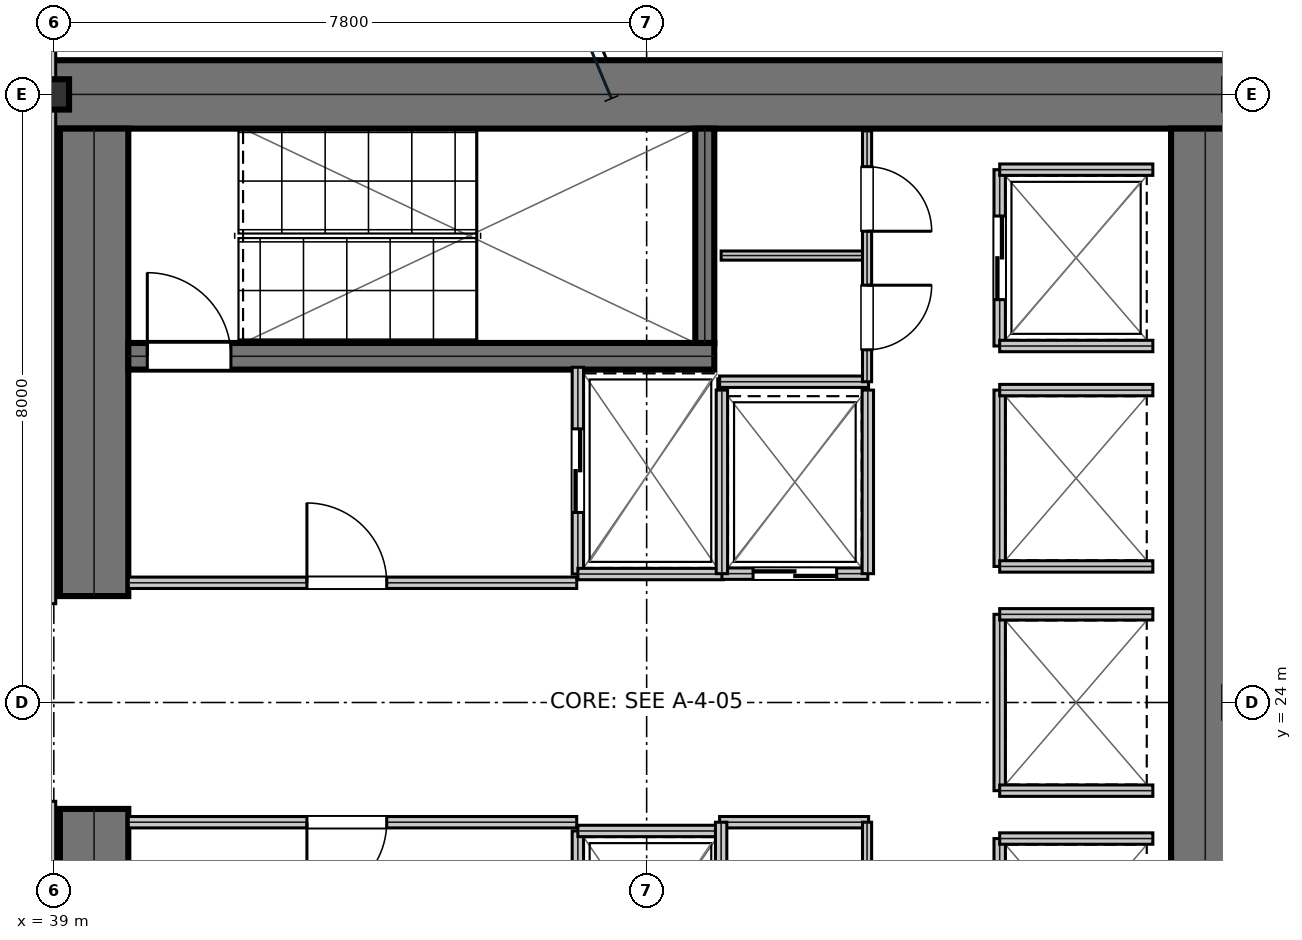
"""IFC4 building model, lengths in metres.
Left out: names, types, materials, properties, quantities, classifications, styles, units other than length and angle.
Written with IfcOpenShell. Run it as: python <this file> out.ifc"""

import sys

from ifc_helpers import new_model, si_unit, direction, frame, frame_2d, origin, origin_2d, place, context, subcontext, project, spatial, rectangle, i_section, extrude, element, fill, save


model = new_model("IFC4")
c1 = context("Model", 3, precision=1e-05, world=origin(), true_north=direction((0.0, 1.0)))
c2 = subcontext(c1, "Body", "Model", "MODEL_VIEW")
j1 = project(units=[si_unit("LENGTHUNIT", "METRE"), si_unit("PLANEANGLEUNIT", "RADIAN")], contexts=[c1])
p1 = place(None, origin())
s1 = spatial("IfcSite", under=j1, at=p1, CompositionType="ELEMENT")
p2 = place(p1, origin())
s2 = spatial("IfcBuilding", under=s1, at=p2, CompositionType="ELEMENT")
p3 = place(p2, frame((0.0, 0.0, 82.35)))
s3 = spatial("IfcBuildingStorey", under=s2, at=p3, CompositionType="ELEMENT", Elevation=82.35)
p4 = place(p3, frame((38.8, 32.0, 0.0), z_axis=(0.0, 0.0, 1.0), x_axis=(1.0, 0.0, 0.0)))
e1 = element("IfcWall", 1, at=p4, inside=s3, PredefinedType="SHEAR", context=c2, shape_type="SweptSolid", body=[
    extrude(rectangle(XDim=16.0, YDim=0.9, at=frame_2d((8.0, 0.0))), origin(), (0.0, 0.0, 1.0), 3.81),
])
for number, where, z_axis, x_axis in (
    (2, (39.53, 16.45, 0.0), (0.0, 0.0, 1.0), (0.0, 1.0, 0.0)),
    (3, (39.53, 25.4, 0.0), (0.0, 0.0, 1.0), (0.0, 1.0, 0.0)),
):
    element("IfcWall", number, at=place(p3, frame(where, z_axis=z_axis, x_axis=x_axis)), inside=s3, PredefinedType="SHEAR", context=c2, shape_type="SweptSolid", body=[
        extrude(rectangle(XDim=6.15, YDim=0.9, at=frame_2d((3.075, 0.0))), origin(), (0.0, 0.0, 1.0), 3.81),
    ])
p5 = place(p3, frame((54.15, 16.45, 0.0), z_axis=(0.0, 0.0, 1.0), x_axis=(0.0, 1.0, 0.0)))
e4 = element("IfcWall", 4, at=p5, inside=s3, PredefinedType="SHEAR", context=c2, shape_type="SweptSolid", body=[
    extrude(rectangle(XDim=15.1, YDim=0.9, at=frame_2d((7.55, 0.0))), origin(), (0.0, 0.0, 1.0), 3.81),
])
p6 = place(p3, frame((39.98, 28.555, 0.0), z_axis=(0.0, 0.0, 1.0), x_axis=(1.0, 0.0, 0.0)))
e5 = element("IfcWall", 5, at=p6, inside=s3, PredefinedType="SHEAR", context=c2, shape_type="SweptSolid", body=[
    extrude(rectangle(XDim=7.71, YDim=0.35, at=frame_2d((3.855, 0.0))), origin(), (0.0, 0.0, 1.0), 3.81),
])
p7 = place(p6, frame((0.25, 0.0, 0.0)))
e6 = element("IfcOpeningElement", 6, at=p7, cuts=e5, PredefinedType="OPENING", context=c2, shape_type="SweptSolid", body=[
    extrude(rectangle(XDim=1.1, YDim=2.15, at=frame_2d((0.55, 1.075))), frame((0.0, 0.185, 0.0), z_axis=(0.0, -1.0, 0.0), x_axis=(1.0, 0.0, 0.0)), (0.0, 0.0, 1.0), 0.37),
])
p8 = place(p3, frame((47.565, 28.73, 0.0), z_axis=(0.0, 0.0, 1.0), x_axis=(0.0, 1.0, 0.0)))
e7 = element("IfcWall", 7, at=p8, inside=s3, PredefinedType="SHEAR", context=c2, shape_type="SweptSolid", body=[
    extrude(rectangle(XDim=2.82, YDim=0.25, at=frame_2d((1.41, 0.0))), origin(), (0.0, 0.0, 1.0), 3.81),
])
p9 = place(p3, frame((39.0, 32.0, 0.0), z_axis=(0.0, 0.0, 1.0), x_axis=(1.0, 0.0, 0.0)))
e8 = element("IfcColumn", 8, at=p9, inside=s3, PredefinedType="COLUMN", context=c2, shape_type="SweptSolid", body=[
    extrude(i_section(OverallWidth=0.401, OverallDepth=0.399, WebThickness=0.025, FlangeThickness=0.04, at=origin_2d()), origin(), (0.0, 0.0, 1.0), 4.044),
])
p10 = place(p3, frame((39.98, 25.575, 0.0), z_axis=(0.0, 0.0, 1.0), x_axis=(1.0, 0.0, 0.0)))
e9 = element("IfcWall", 9, at=p10, inside=s3, PredefinedType="PARTITIONING", context=c2, shape_type="SweptSolid", body=[
    extrude(rectangle(XDim=5.9, YDim=0.15, at=frame_2d((2.95, 0.0))), origin(), (0.0, 0.0, 1.0), 3.81),
])
p11 = place(p10, frame((2.35, 0.0, 0.0)))
e10 = element("IfcOpeningElement", 10, at=p11, cuts=e9, PredefinedType="OPENING", context=c2, shape_type="SweptSolid", body=[
    extrude(rectangle(XDim=1.05, YDim=2.15, at=frame_2d((0.525, 1.075))), frame((0.0, 0.085, 0.0), z_axis=(0.0, -1.0, 0.0), x_axis=(1.0, 0.0, 0.0)), (0.0, 0.0, 1.0), 0.17),
])
p12 = place(p3, frame((39.98, 22.425, 0.0), z_axis=(0.0, 0.0, 1.0), x_axis=(1.0, 0.0, 0.0)))
e11 = element("IfcWall", 11, at=p12, inside=s3, PredefinedType="PARTITIONING", context=c2, shape_type="SweptSolid", body=[
    extrude(rectangle(XDim=5.9, YDim=0.15, at=frame_2d((2.95, 0.0))), origin(), (0.0, 0.0, 1.0), 3.81),
])
p13 = place(p12, frame((2.35, 0.0, 0.0)))
e12 = element("IfcOpeningElement", 12, at=p13, cuts=e11, PredefinedType="OPENING", context=c2, shape_type="SweptSolid", body=[
    extrude(rectangle(XDim=1.05, YDim=2.15, at=frame_2d((0.525, 1.075))), frame((0.0, 0.085, 0.0), z_axis=(0.0, -1.0, 0.0), x_axis=(1.0, 0.0, 0.0)), (0.0, 0.0, 1.0), 0.17),
])
p14 = place(p3, frame((45.895, 25.69, 0.0), z_axis=(0.0, 0.0, 1.0), x_axis=(0.0, 1.0, 0.0)))
e13 = element("IfcWall", 13, at=p14, inside=s3, PredefinedType="PARTITIONING", context=c2, shape_type="SweptSolid", body=[
    extrude(rectangle(XDim=2.72, YDim=0.15, at=frame_2d((1.36, 0.0))), origin(), (0.0, 0.0, 1.0), 3.81),
])
p15 = place(p14, frame((0.81, 0.0, 0.0)))
e14 = element("IfcOpeningElement", 14, at=p15, cuts=e13, PredefinedType="OPENING", context=c2, shape_type="SweptSolid", body=[
    extrude(rectangle(XDim=1.1, YDim=2.15, at=frame_2d((0.55, 1.075))), frame((0.0, 0.085, 0.0), z_axis=(0.0, -1.0, 0.0), x_axis=(1.0, 0.0, 0.0)), (0.0, 0.0, 1.0), 0.17),
])
p16 = place(p3, frame((45.895, 25.69, 0.0), z_axis=(0.0, 0.0, 1.0), x_axis=(1.0, 0.0, 0.0)))
e15 = element("IfcWall", 15, at=p16, inside=s3, PredefinedType="PARTITIONING", context=c2, shape_type="SweptSolid", body=[
    extrude(rectangle(XDim=1.915, YDim=0.15, at=frame_2d((0.958, 0.0))), origin(), (0.0, 0.0, 1.0), 3.81),
])
p17 = place(p3, frame((45.895, 19.59, 0.0), z_axis=(0.0, 0.0, 1.0), x_axis=(0.0, 1.0, 0.0)))
e16 = element("IfcWall", 16, at=p17, inside=s3, PredefinedType="PARTITIONING", context=c2, shape_type="SweptSolid", body=[
    extrude(rectangle(XDim=2.72, YDim=0.15, at=frame_2d((1.36, 0.0))), origin(), (0.0, 0.0, 1.0), 3.81),
])
p18 = place(p17, frame((0.81, 0.0, 0.0)))
e17 = element("IfcOpeningElement", 17, at=p18, cuts=e16, PredefinedType="OPENING", context=c2, shape_type="SweptSolid", body=[
    extrude(rectangle(XDim=1.1, YDim=2.15, at=frame_2d((0.55, 1.075))), frame((0.0, 0.085, 0.0), z_axis=(0.0, -1.0, 0.0), x_axis=(1.0, 0.0, 0.0)), (0.0, 0.0, 1.0), 0.17),
])
p19 = place(p3, frame((45.895, 22.31, 0.0), z_axis=(0.0, 0.0, 1.0), x_axis=(1.0, 0.0, 0.0)))
e18 = element("IfcWall", 18, at=p19, inside=s3, PredefinedType="PARTITIONING", context=c2, shape_type="SweptSolid", body=[
    extrude(rectangle(XDim=1.915, YDim=0.15, at=frame_2d((0.958, 0.0))), origin(), (0.0, 0.0, 1.0), 3.81),
])
p20 = place(p3, frame((47.79, 25.695, 0.0), z_axis=(0.0, 0.0, 1.0), x_axis=(1.0, 0.0, 0.0)))
e19 = element("IfcWall", 19, at=p20, inside=s3, PredefinedType="PARTITIONING", context=c2, shape_type="SweptSolid", body=[
    extrude(rectangle(XDim=1.92, YDim=0.15, at=frame_2d((0.96, 0.0))), origin(), (0.0, 0.0, 1.0), 3.81),
])
p21 = place(p20, frame((0.41, 0.0, 0.0)))
e20 = element("IfcOpeningElement", 20, at=p21, cuts=e19, PredefinedType="OPENING", context=c2, shape_type="SweptSolid", body=[
    extrude(rectangle(XDim=1.1, YDim=2.15, at=frame_2d((0.55, 1.075))), frame((0.0, 0.085, 0.0), z_axis=(0.0, -1.0, 0.0), x_axis=(1.0, 0.0, 0.0)), (0.0, 0.0, 1.0), 0.17),
])
for number, where, z_axis, x_axis in (
    (21, (47.79, 25.695, 0.0), (0.0, 0.0, 1.0), (0.0, 1.0, 0.0)),
    (22, (49.71, 25.695, 0.0), (0.0, 0.0, 1.0), (0.0, 1.0, 0.0)),
):
    element("IfcWall", number, at=place(p3, frame(where, z_axis=z_axis, x_axis=x_axis)), inside=s3, PredefinedType="PARTITIONING", context=c2, shape_type="SweptSolid", body=[
        extrude(rectangle(XDim=2.415, YDim=0.15, at=frame_2d((1.208, 0.0))), origin(), (0.0, 0.0, 1.0), 3.81),
    ])
p22 = place(p3, frame((51.445, 28.69, 0.0), z_axis=(0.0, 0.0, 1.0), x_axis=(0.0, 1.0, 0.0)))
e23 = element("IfcWall", 23, at=p22, inside=s3, PredefinedType="PARTITIONING", context=c2, shape_type="SweptSolid", body=[
    extrude(rectangle(XDim=2.32, YDim=0.15, at=frame_2d((1.16, 0.0))), origin(), (0.0, 0.0, 1.0), 3.81),
])
p23 = place(p22, frame((0.61, 0.0, 0.0)))
e24 = element("IfcOpeningElement", 24, at=p23, cuts=e23, PredefinedType="OPENING", context=c2, shape_type="SweptSolid", body=[
    extrude(rectangle(XDim=1.1, YDim=2.15, at=frame_2d((0.55, 1.075))), frame((0.0, 0.085, 0.0), z_axis=(0.0, -1.0, 0.0), x_axis=(1.0, 0.0, 0.0)), (0.0, 0.0, 1.0), 0.17),
])
for number, where, z_axis, x_axis in (
    (25, (51.445, 28.69, 0.0), (0.0, 0.0, 1.0), (1.0, 0.0, 0.0)),
    (26, (51.445, 31.01, 0.0), (0.0, 0.0, 1.0), (1.0, 0.0, 0.0)),
):
    element("IfcWall", number, at=place(p3, frame(where, z_axis=z_axis, x_axis=x_axis)), inside=s3, PredefinedType="PARTITIONING", context=c2, shape_type="SweptSolid", body=[
        extrude(rectangle(XDim=2.015, YDim=0.15, at=frame_2d((1.007, 0.0))), origin(), (0.0, 0.0, 1.0), 3.81),
    ])
p24 = place(p3, frame((51.445, 25.79, 0.0), z_axis=(0.0, 0.0, 1.0), x_axis=(0.0, 1.0, 0.0)))
e27 = element("IfcWall", 27, at=p24, inside=s3, PredefinedType="PARTITIONING", context=c2, shape_type="SweptSolid", body=[
    extrude(rectangle(XDim=2.32, YDim=0.15, at=frame_2d((1.16, 0.0))), origin(), (0.0, 0.0, 1.0), 3.81),
])
for number, where, z_axis, x_axis in (
    (28, (51.445, 25.79, 0.0), (0.0, 0.0, 1.0), (1.0, 0.0, 0.0)),
    (29, (51.445, 28.11, 0.0), (0.0, 0.0, 1.0), (1.0, 0.0, 0.0)),
):
    element("IfcWall", number, at=place(p3, frame(where, z_axis=z_axis, x_axis=x_axis)), inside=s3, PredefinedType="PARTITIONING", context=c2, shape_type="SweptSolid", body=[
        extrude(rectangle(XDim=2.015, YDim=0.15, at=frame_2d((1.007, 0.0))), origin(), (0.0, 0.0, 1.0), 3.81),
    ])
p25 = place(p3, frame((51.445, 19.89, 0.0), z_axis=(0.0, 0.0, 1.0), x_axis=(0.0, 1.0, 0.0)))
e30 = element("IfcWall", 30, at=p25, inside=s3, PredefinedType="PARTITIONING", context=c2, shape_type="SweptSolid", body=[
    extrude(rectangle(XDim=2.32, YDim=0.15, at=frame_2d((1.16, 0.0))), origin(), (0.0, 0.0, 1.0), 3.81),
])
p26 = place(p3, frame((51.445, 22.21, 0.0), z_axis=(0.0, 0.0, 1.0), x_axis=(1.0, 0.0, 0.0)))
e31 = element("IfcWall", 31, at=p26, inside=s3, PredefinedType="PARTITIONING", context=c2, shape_type="SweptSolid", body=[
    extrude(rectangle(XDim=2.015, YDim=0.15, at=frame_2d((1.007, 0.0))), origin(), (0.0, 0.0, 1.0), 3.81),
])
p27 = place(p3, frame((51.445, 22.84, 0.0), z_axis=(0.0, 0.0, 1.0), x_axis=(0.0, 1.0, 0.0)))
e32 = element("IfcWall", 32, at=p27, inside=s3, PredefinedType="PARTITIONING", context=c2, shape_type="SweptSolid", body=[
    extrude(rectangle(XDim=2.32, YDim=0.15, at=frame_2d((1.16, 0.0))), origin(), (0.0, 0.0, 1.0), 3.81),
])
for number, where, z_axis, x_axis in (
    (33, (51.445, 22.84, 0.0), (0.0, 0.0, 1.0), (1.0, 0.0, 0.0)),
    (34, (51.445, 25.16, 0.0), (0.0, 0.0, 1.0), (1.0, 0.0, 0.0)),
):
    element("IfcWall", number, at=place(p3, frame(where, z_axis=z_axis, x_axis=x_axis)), inside=s3, PredefinedType="PARTITIONING", context=c2, shape_type="SweptSolid", body=[
        extrude(rectangle(XDim=2.015, YDim=0.15, at=frame_2d((1.007, 0.0))), origin(), (0.0, 0.0, 1.0), 3.81),
    ])
p28 = place(p3, frame((47.76, 22.425, 0.0), z_axis=(0.0, 0.0, 1.0), x_axis=(1.0, 0.0, 0.0)))
e35 = element("IfcWall", 35, at=p28, inside=s3, PredefinedType="PARTITIONING", context=c2, shape_type="SweptSolid", body=[
    extrude(rectangle(XDim=1.96, YDim=0.15, at=frame_2d((0.98, 0.0))), origin(), (0.0, 0.0, 1.0), 3.81),
])
p29 = place(p3, frame((47.78, 16.45, 0.0), z_axis=(0.0, 0.0, 1.0), x_axis=(0.0, 1.0, 0.0)))
e36 = element("IfcWall", 36, at=p29, inside=s3, PredefinedType="PARTITIONING", context=c2, shape_type="SweptSolid", body=[
    extrude(rectangle(XDim=5.975, YDim=0.15, at=frame_2d((2.988, 0.0))), origin(), (0.0, 0.0, 1.0), 3.81),
])
p30 = place(p3, frame((49.7, 16.48, 0.0), z_axis=(0.0, 0.0, 1.0), x_axis=(0.0, 1.0, 0.0)))
e37 = element("IfcWall", 37, at=p30, inside=s3, PredefinedType="PARTITIONING", context=c2, shape_type="SweptSolid", body=[
    extrude(rectangle(XDim=5.945, YDim=0.12, at=frame_2d((2.973, 0.0))), origin(), (0.0, 0.0, 1.0), 3.81),
])
p31 = place(p30, frame((3.35, 0.0, 0.0)))
e38 = element("IfcOpeningElement", 38, at=p31, cuts=e37, PredefinedType="OPENING", context=c2, shape_type="SweptSolid", body=[
    extrude(rectangle(XDim=0.95, YDim=2.15, at=frame_2d((0.475, 1.075))), frame((0.0, 0.07, 0.0), z_axis=(0.0, -1.0, 0.0), x_axis=(1.0, 0.0, 0.0)), (0.0, 0.0, 1.0), 0.14),
])
p32 = place(p3, frame((47.76, 28.22, 0.0), z_axis=(0.0, 0.0, 1.0), x_axis=(1.0, 0.0, 0.0)))
e39 = element("IfcWall", 39, at=p32, inside=s3, PredefinedType="PARTITIONING", context=c2, shape_type="SweptSolid", body=[
    extrude(rectangle(XDim=1.96, YDim=0.15, at=frame_2d((0.98, 0.0))), origin(), (0.0, 0.0, 1.0), 3.81),
])
p33 = place(p3, frame((47.78, 29.88, 0.0), z_axis=(0.0, 0.0, 1.0), x_axis=(1.0, 0.0, 0.0)))
e40 = element("IfcWall", 40, at=p33, inside=s3, PredefinedType="PARTITIONING", context=c2, shape_type="SweptSolid", body=[
    extrude(rectangle(XDim=1.92, YDim=0.12, at=frame_2d((0.96, 0.0))), origin(), (0.0, 0.0, 1.0), 3.81),
])
p34 = place(p3, frame((49.7, 28.22, 0.0), z_axis=(0.0, 0.0, 1.0), x_axis=(0.0, 1.0, 0.0)))
e41 = element("IfcWall", 41, at=p34, inside=s3, PredefinedType="PARTITIONING", context=c2, shape_type="SweptSolid", body=[
    extrude(rectangle(XDim=3.3, YDim=0.12, at=frame_2d((1.65, 0.0))), origin(), (0.0, 0.0, 1.0), 3.81),
])
p35 = place(p34, frame((0.42, 0.0, 0.0)))
e42 = element("IfcOpeningElement", 42, at=p35, cuts=e41, PredefinedType="OPENING", context=c2, shape_type="SweptSolid", body=[
    extrude(rectangle(XDim=0.85, YDim=2.15, at=frame_2d((0.425, 1.075))), frame((0.0, 0.07, 0.0), z_axis=(0.0, -1.0, 0.0), x_axis=(1.0, 0.0, 0.0)), (0.0, 0.0, 1.0), 0.14),
])
p36 = place(p34, frame((1.98, 0.0, 0.0)))
e43 = element("IfcOpeningElement", 43, at=p36, cuts=e41, PredefinedType="OPENING", context=c2, shape_type="SweptSolid", body=[
    extrude(rectangle(XDim=0.85, YDim=2.15, at=frame_2d((0.425, 1.075))), frame((0.0, 0.07, 0.0), z_axis=(0.0, -1.0, 0.0), x_axis=(1.0, 0.0, 0.0)), (0.0, 0.0, 1.0), 0.14),
])
p37 = place(p3, frame((38.95, 14.546, 0.0), z_axis=(0.0, 0.0, 1.0), x_axis=(0.0, 1.0, 0.0)))
e44 = element("IfcWall", 44, at=p37, inside=s3, PredefinedType="PARTITIONING", context=c2, shape_type="SweptSolid", body=[
    extrude(rectangle(XDim=8.154, YDim=0.15, at=frame_2d((4.077, 0.0))), origin(), (0.0, 0.0, 1.0), 3.181),
])
p38 = place(p3, frame((38.95, 25.3, 0.0), z_axis=(0.0, 0.0, 1.0), x_axis=(0.0, 1.0, 0.0)))
e45 = element("IfcWall", 45, at=p38, inside=s3, PredefinedType="PARTITIONING", context=c2, shape_type="SweptSolid", body=[
    extrude(rectangle(XDim=8.2, YDim=0.15, at=frame_2d((4.1, 0.0))), origin(), (0.0, 0.0, 1.0), 3.181),
])
p39 = place(p11, origin())
e46 = element("IfcDoor", 46, at=p39, inside=s3, OperationType="SINGLE_SWING_LEFT", PredefinedType="DOOR", context=c2, shape_type="SweptSolid", body=[
    extrude(rectangle(XDim=1.05, YDim=2.15, at=frame_2d((0.525, 1.075))), frame((0.0, 0.025, 0.0), z_axis=(0.0, -1.0, 0.0), x_axis=(1.0, 0.0, 0.0)), (0.0, 0.0, 1.0), 0.05),
])
fill(e10, e46)
p40 = place(p13, frame((1.05, 0.0, 0.0), z_axis=(0.0, 0.0, 1.0), x_axis=(-1.0, 0.0, 0.0)))
e47 = element("IfcDoor", 47, at=p40, inside=s3, OperationType="SINGLE_SWING_RIGHT", PredefinedType="DOOR", context=c2, shape_type="SweptSolid", body=[
    extrude(rectangle(XDim=1.05, YDim=2.15, at=frame_2d((0.525, 1.075))), frame((0.0, 0.025, 0.0), z_axis=(0.0, -1.0, 0.0), x_axis=(1.0, 0.0, 0.0)), (0.0, 0.0, 1.0), 0.05),
])
fill(e12, e47)
p41 = place(p15, frame((1.1, 0.0, 0.0), z_axis=(0.0, 0.0, 1.0), x_axis=(-1.0, 0.0, 0.0)))
e48 = element("IfcDoor", 48, at=p41, inside=s3, OperationType="DOUBLE_DOOR_SLIDING", PredefinedType="DOOR", context=c2, shape_type="SweptSolid", body=[
    extrude(rectangle(XDim=1.1, YDim=2.15, at=frame_2d((0.55, 1.075))), frame((0.0, 0.025, 0.0), z_axis=(0.0, -1.0, 0.0), x_axis=(1.0, 0.0, 0.0)), (0.0, 0.0, 1.0), 0.05),
])
fill(e14, e48)
p42 = place(p21, frame((1.1, 0.0, 0.0), z_axis=(0.0, 0.0, 1.0), x_axis=(-1.0, 0.0, 0.0)))
e49 = element("IfcDoor", 49, at=p42, inside=s3, OperationType="DOUBLE_DOOR_SLIDING", PredefinedType="DOOR", context=c2, shape_type="SweptSolid", body=[
    extrude(rectangle(XDim=1.1, YDim=2.15, at=frame_2d((0.55, 1.075))), frame((0.0, 0.025, 0.0), z_axis=(0.0, -1.0, 0.0), x_axis=(1.0, 0.0, 0.0)), (0.0, 0.0, 1.0), 0.05),
])
fill(e20, e49)
p43 = place(p23, frame((1.1, 0.0, 0.0), z_axis=(0.0, 0.0, 1.0), x_axis=(-1.0, 0.0, 0.0)))
e50 = element("IfcDoor", 50, at=p43, inside=s3, OperationType="DOUBLE_DOOR_SLIDING", PredefinedType="DOOR", context=c2, shape_type="SweptSolid", body=[
    extrude(rectangle(XDim=1.1, YDim=2.15, at=frame_2d((0.55, 1.075))), frame((0.0, 0.025, 0.0), z_axis=(0.0, -1.0, 0.0), x_axis=(1.0, 0.0, 0.0)), (0.0, 0.0, 1.0), 0.05),
])
fill(e24, e50)
p44 = place(p35, frame((0.85, 0.0, 0.0), z_axis=(0.0, 0.0, 1.0), x_axis=(-1.0, 0.0, 0.0)))
e51 = element("IfcDoor", 51, at=p44, inside=s3, OperationType="SINGLE_SWING_LEFT", PredefinedType="DOOR", context=c2, shape_type="SweptSolid", body=[
    extrude(rectangle(XDim=0.85, YDim=2.15, at=frame_2d((0.425, 1.075))), frame((0.0, 0.025, 0.0), z_axis=(0.0, -1.0, 0.0), x_axis=(1.0, 0.0, 0.0)), (0.0, 0.0, 1.0), 0.05),
])
fill(e42, e51)
p45 = place(p36, frame((0.85, 0.0, 0.0), z_axis=(0.0, 0.0, 1.0), x_axis=(-1.0, 0.0, 0.0)))
e52 = element("IfcDoor", 52, at=p45, inside=s3, OperationType="SINGLE_SWING_RIGHT", PredefinedType="DOOR", context=c2, shape_type="SweptSolid", body=[
    extrude(rectangle(XDim=0.85, YDim=2.15, at=frame_2d((0.425, 1.075))), frame((0.0, 0.025, 0.0), z_axis=(0.0, -1.0, 0.0), x_axis=(1.0, 0.0, 0.0)), (0.0, 0.0, 1.0), 0.05),
])
fill(e43, e52)
p46 = place(p7, origin())
e53 = element("IfcDoor", 53, at=p46, inside=s3, OperationType="SINGLE_SWING_LEFT", PredefinedType="DOOR", context=c2, shape_type="SweptSolid", body=[
    extrude(rectangle(XDim=1.1, YDim=2.15, at=frame_2d((0.55, 1.075))), frame((0.0, 0.025, 0.0), z_axis=(0.0, -1.0, 0.0), x_axis=(1.0, 0.0, 0.0)), (0.0, 0.0, 1.0), 0.05),
])
fill(e6, e53)
save(model, sys.argv[1])
